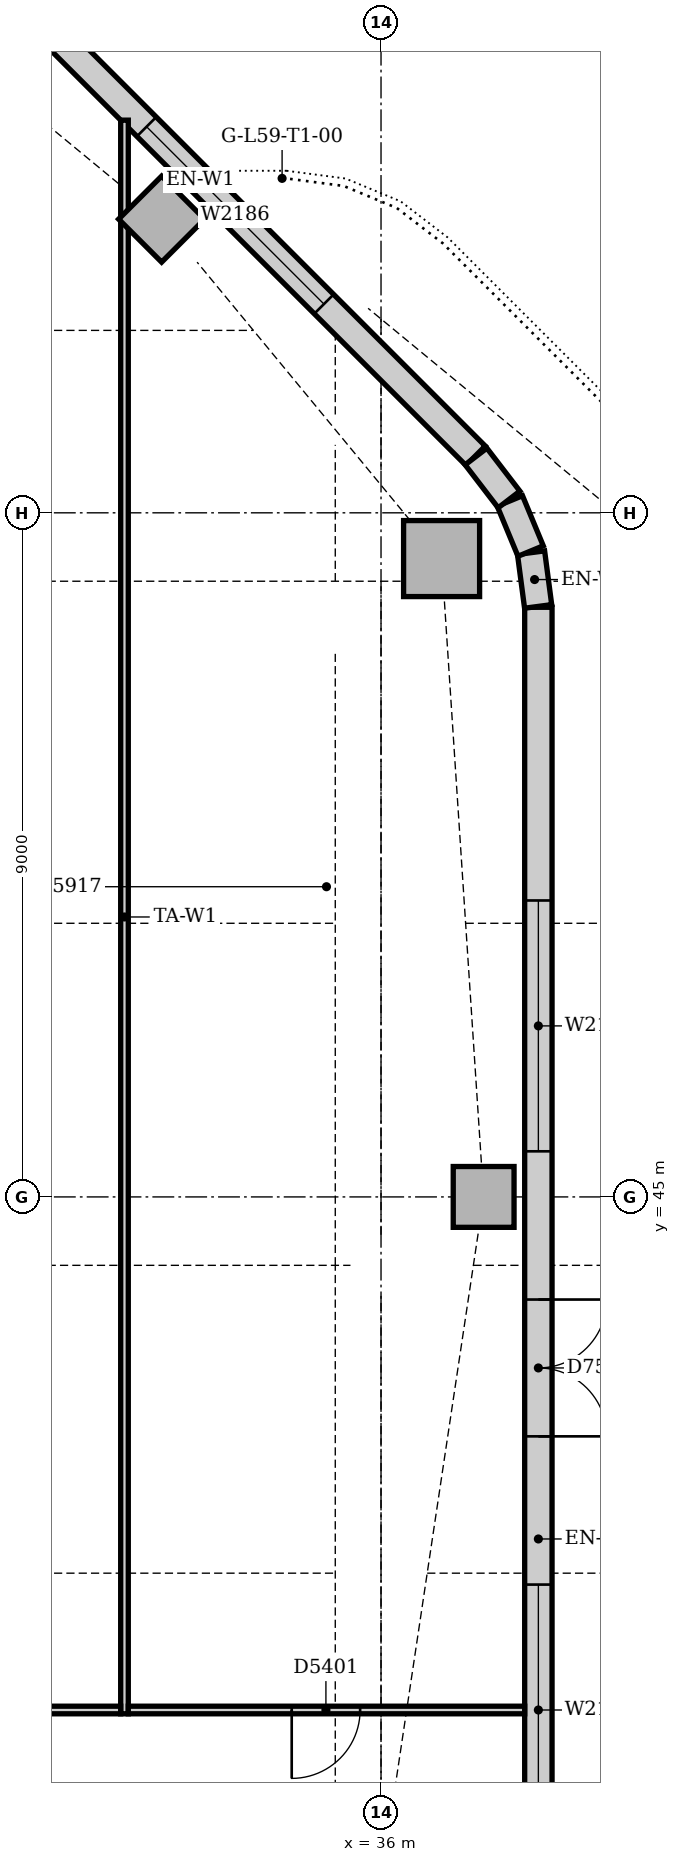
"""IFC4 building model, lengths in metres.
Left out: names, types, materials, properties, quantities, classifications, styles, units other than length and angle.
Written with IfcOpenShell. Run it as: python <this file> out.ifc"""

import sys

from ifc_helpers import new_model, si_unit, direction, frame, frame_2d, origin, origin_2d, place, context, subcontext, project, spatial, rectangle, extrude, element, fill, save


model = new_model("IFC4")
c1 = context("Model", 3, precision=1e-05, world=origin(), true_north=direction((0.0, 1.0)))
c2 = subcontext(c1, "Body", "Model", "MODEL_VIEW")
j1 = project(units=[si_unit("LENGTHUNIT", "METRE"), si_unit("PLANEANGLEUNIT", "RADIAN")], contexts=[c1])
p1 = place(None, origin())
s1 = spatial("IfcSite", under=j1, at=p1, CompositionType="ELEMENT")
p2 = place(p1, origin())
s2 = spatial("IfcBuilding", under=s1, at=p2, CompositionType="ELEMENT")
p3 = place(p2, frame((0.0, 0.0, 247.0)))
s3 = spatial("IfcBuildingStorey", under=s2, at=p3, CompositionType="ELEMENT", Elevation=247.0)
p4 = place(p3, frame((36.797, 53.398, -0.15), z_axis=(0.0, 0.0, 1.0), x_axis=(1.0, 0.0, 0.0)))
e1 = element("IfcColumn", 1, at=p4, inside=s3, PredefinedType="COLUMN", context=c2, shape_type="SweptSolid", body=[
    extrude(rectangle(XDim=1.0, YDim=1.0, at=origin_2d()), origin(), (0.0, 0.0, 1.0), 4.0),
])
for number, where, z_axis, x_axis in (
    (2, (37.35, 45.0, -0.15), (0.0, 0.0, 1.0), (1.0, 0.0, 0.0)),
    (3, (33.114, 57.864, -0.15), (0.0, 0.0, 1.0), (0.707, 0.707, 0.0)),
):
    element("IfcColumn", number, at=place(p3, frame(where, z_axis=z_axis, x_axis=x_axis)), inside=s3, PredefinedType="COLUMN", context=c2, shape_type="SweptSolid", body=[
        extrude(rectangle(XDim=0.8, YDim=0.8, at=origin_2d()), origin(), (0.0, 0.0, 1.0), 4.0),
    ])
p5 = place(p3, frame((38.07, 28.243, 0.0), z_axis=(0.0, 0.0, 1.0), x_axis=(0.0, 1.0, 0.0)))
e4 = element("IfcWall", 4, at=p5, inside=s3, PredefinedType="STANDARD", context=c2, shape_type="SweptSolid", body=[
    extrude(rectangle(XDim=24.515, YDim=0.36, at=frame_2d((12.257, 0.0))), origin(), (0.0, 0.0, 1.0), 3.85),
])
p6 = place(p5, frame((3.857, 0.0, 0.9)))
e5 = element("IfcOpeningElement", 5, at=p6, cuts=e4, PredefinedType="OPENING", context=c2, shape_type="SweptSolid", body=[
    extrude(rectangle(XDim=3.3, YDim=1.6, at=frame_2d((1.65, 0.8))), frame((0.0, 0.19, 0.0), z_axis=(0.0, -1.0, 0.0), x_axis=(1.0, 0.0, 0.0)), (0.0, 0.0, 1.0), 0.38),
])
p7 = place(p5, frame((8.357, 0.0, 0.9)))
e6 = element("IfcOpeningElement", 6, at=p7, cuts=e4, PredefinedType="OPENING", context=c2, shape_type="SweptSolid", body=[
    extrude(rectangle(XDim=3.3, YDim=1.6, at=frame_2d((1.65, 0.8))), frame((0.0, 0.19, 0.0), z_axis=(0.0, -1.0, 0.0), x_axis=(1.0, 0.0, 0.0)), (0.0, 0.0, 1.0), 0.38),
])
p8 = place(p5, frame((13.607, 0.0, 0.0)))
e7 = element("IfcOpeningElement", 7, at=p8, cuts=e4, PredefinedType="OPENING", context=c2, shape_type="SweptSolid", body=[
    extrude(rectangle(XDim=1.8, YDim=2.4, at=frame_2d((0.9, 1.2))), frame((0.0, 0.19, 0.0), z_axis=(0.0, -1.0, 0.0), x_axis=(1.0, 0.0, 0.0)), (0.0, 0.0, 1.0), 0.38),
])
p9 = place(p5, frame((17.357, 0.0, 0.9)))
e8 = element("IfcOpeningElement", 8, at=p9, cuts=e4, PredefinedType="OPENING", context=c2, shape_type="SweptSolid", body=[
    extrude(rectangle(XDim=3.3, YDim=1.6, at=frame_2d((1.65, 0.8))), frame((0.0, 0.19, 0.0), z_axis=(0.0, -1.0, 0.0), x_axis=(1.0, 0.0, 0.0)), (0.0, 0.0, 1.0), 0.38),
])
p10 = place(p3, frame((37.244, 54.751, 0.0), z_axis=(0.0, 0.0, 1.0), x_axis=(-0.707106781187, 0.707106781187, 0.0)))
e9 = element("IfcWall", 9, at=p10, inside=s3, PredefinedType="STANDARD", context=c2, shape_type="SweptSolid", body=[
    extrude(rectangle(XDim=10.243, YDim=0.36, at=frame_2d((5.121, 0.0))), origin(), (0.0, 0.0, 1.0), 3.85),
])
p11 = place(p10, frame((2.821, 0.0, 0.9)))
e10 = element("IfcOpeningElement", 10, at=p11, cuts=e9, PredefinedType="OPENING", context=c2, shape_type="SweptSolid", body=[
    extrude(rectangle(XDim=3.3, YDim=1.6, at=frame_2d((1.65, 0.8))), frame((0.0, 0.19, 0.0), z_axis=(0.0, -1.0, 0.0), x_axis=(1.0, 0.0, 0.0)), (0.0, 0.0, 1.0), 0.38),
])
for number, where, z_axis, x_axis in (
    (11, (38.067, 52.769, 0.0), (0.0, 0.0, 1.0), (-0.131, 0.991, 0.0)),
    (12, (37.968, 53.497, 0.0), (0.0, 0.0, 1.0), (-0.383, 0.924, 0.0)),
):
    element("IfcWall", number, at=place(p3, frame(where, z_axis=z_axis, x_axis=x_axis)), inside=s3, PredefinedType="STANDARD", context=c2, shape_type="SweptSolid", body=[
        extrude(rectangle(XDim=0.713, YDim=0.36, at=frame_2d((0.356, 0.0))), origin(), (0.0, 0.0, 1.0), 3.85),
    ])
p12 = place(p3, frame((37.684, 54.175, 0.0), z_axis=(0.0, 0.0, 1.0), x_axis=(-0.608802368033, 0.793321924995, 0.0)))
e13 = element("IfcWall", 13, at=p12, inside=s3, PredefinedType="STANDARD", context=c2, shape_type="SweptSolid", body=[
    extrude(rectangle(XDim=0.713, YDim=0.36, at=frame_2d((0.357, 0.0))), origin(), (0.0, 0.0, 1.0), 3.85),
])
p13 = place(p3, frame((32.625, 38.2, 0.0), z_axis=(0.0, 0.0, 1.0), x_axis=(0.0, 1.0, 0.0)))
e14 = element("IfcWall", 14, at=p13, inside=s3, PredefinedType="PARTITIONING", context=c2, shape_type="SweptSolid", body=[
    extrude(rectangle(XDim=20.966, YDim=0.1, at=frame_2d((10.483, 0.0))), origin(), (0.0, 0.0, 1.0), 3.85),
])
p14 = place(p3, frame((27.075, 38.25, 0.0), z_axis=(0.0, 0.0, 1.0), x_axis=(1.0, 0.0, 0.0)))
e15 = element("IfcWall", 15, at=p14, inside=s3, PredefinedType="PARTITIONING", context=c2, shape_type="SweptSolid", body=[
    extrude(rectangle(XDim=5.5, YDim=0.1, at=frame_2d((2.75, 0.0))), origin(), (0.0, 0.0, 1.0), 3.85),
])
p15 = place(p14, frame((2.3, 0.0, 0.0)))
e16 = element("IfcOpeningElement", 16, at=p15, cuts=e15, PredefinedType="OPENING", context=c2, shape_type="SweptSolid", body=[
    extrude(rectangle(XDim=0.9, YDim=2.1, at=frame_2d((0.45, 1.05))), frame((0.0, 0.06, 0.0), z_axis=(0.0, -1.0, 0.0), x_axis=(1.0, 0.0, 0.0)), (0.0, 0.0, 1.0), 0.12),
])
p16 = place(p3, frame((32.675, 38.25, 0.0), z_axis=(0.0, 0.0, 1.0), x_axis=(1.0, 0.0, 0.0)))
e17 = element("IfcWall", 17, at=p16, inside=s3, PredefinedType="PARTITIONING", context=c2, shape_type="SweptSolid", body=[
    extrude(rectangle(XDim=5.215, YDim=0.1, at=frame_2d((2.607, 0.0))), origin(), (0.0, 0.0, 1.0), 3.85),
])
p17 = place(p16, frame((2.15, 0.0, 0.0)))
e18 = element("IfcOpeningElement", 18, at=p17, cuts=e17, PredefinedType="OPENING", context=c2, shape_type="SweptSolid", body=[
    extrude(rectangle(XDim=0.9, YDim=2.1, at=frame_2d((0.45, 1.05))), frame((0.0, 0.06, 0.0), z_axis=(0.0, -1.0, 0.0), x_axis=(1.0, 0.0, 0.0)), (0.0, 0.0, 1.0), 0.12),
])
p18 = place(p7, origin())
e19 = element("IfcWindow", 19, at=p18, inside=s3, PartitioningType="SINGLE_PANEL", PredefinedType="WINDOW", context=c2, shape_type="SweptSolid", body=[
    extrude(rectangle(XDim=3.3, YDim=1.6, at=frame_2d((1.65, 0.8))), frame((0.0, 0.13, 0.0), z_axis=(0.0, -1.0, 0.0), x_axis=(1.0, 0.0, 0.0)), (0.0, 0.0, 1.0), 0.06),
])
fill(e6, e19)
p19 = place(p8, frame((1.8, 0.0, 0.0), z_axis=(0.0, 0.0, 1.0), x_axis=(-1.0, 0.0, 0.0)))
e20 = element("IfcDoor", 20, at=p19, inside=s3, OperationType="DOUBLE_DOOR_SINGLE_SWING", PredefinedType="DOOR", context=c2, shape_type="SweptSolid", body=[
    extrude(rectangle(XDim=1.8, YDim=2.4, at=frame_2d((0.9, 1.2))), frame((0.0, -0.07, 0.0), z_axis=(0.0, -1.0, 0.0), x_axis=(1.0, 0.0, 0.0)), (0.0, 0.0, 1.0), 0.05),
])
fill(e7, e20)
p20 = place(p9, origin())
e21 = element("IfcWindow", 21, at=p20, inside=s3, PartitioningType="SINGLE_PANEL", PredefinedType="WINDOW", context=c2, shape_type="SweptSolid", body=[
    extrude(rectangle(XDim=3.3, YDim=1.6, at=frame_2d((1.65, 0.8))), frame((0.0, 0.13, 0.0), z_axis=(0.0, -1.0, 0.0), x_axis=(1.0, 0.0, 0.0)), (0.0, 0.0, 1.0), 0.06),
])
fill(e8, e21)
p21 = place(p11, origin())
e22 = element("IfcWindow", 22, at=p21, inside=s3, PartitioningType="SINGLE_PANEL", PredefinedType="WINDOW", context=c2, shape_type="SweptSolid", body=[
    extrude(rectangle(XDim=3.3, YDim=1.6, at=frame_2d((1.65, 0.8))), frame((0.0, 0.13, 0.0), z_axis=(0.0, -1.0, 0.0), x_axis=(1.0, 0.0, 0.0)), (0.0, 0.0, 1.0), 0.06),
])
fill(e10, e22)
p22 = place(p17, frame((0.9, 0.0, 0.0), z_axis=(0.0, 0.0, 1.0), x_axis=(-1.0, 0.0, 0.0)))
e23 = element("IfcDoor", 23, at=p22, inside=s3, OperationType="SINGLE_SWING_RIGHT", PredefinedType="DOOR", context=c2, shape_type="SweptSolid", body=[
    extrude(rectangle(XDim=0.9, YDim=2.1, at=frame_2d((0.45, 1.05))), frame((0.0, 0.025, 0.0), z_axis=(0.0, -1.0, 0.0), x_axis=(1.0, 0.0, 0.0)), (0.0, 0.0, 1.0), 0.05),
])
fill(e18, e23)
save(model, sys.argv[1])
